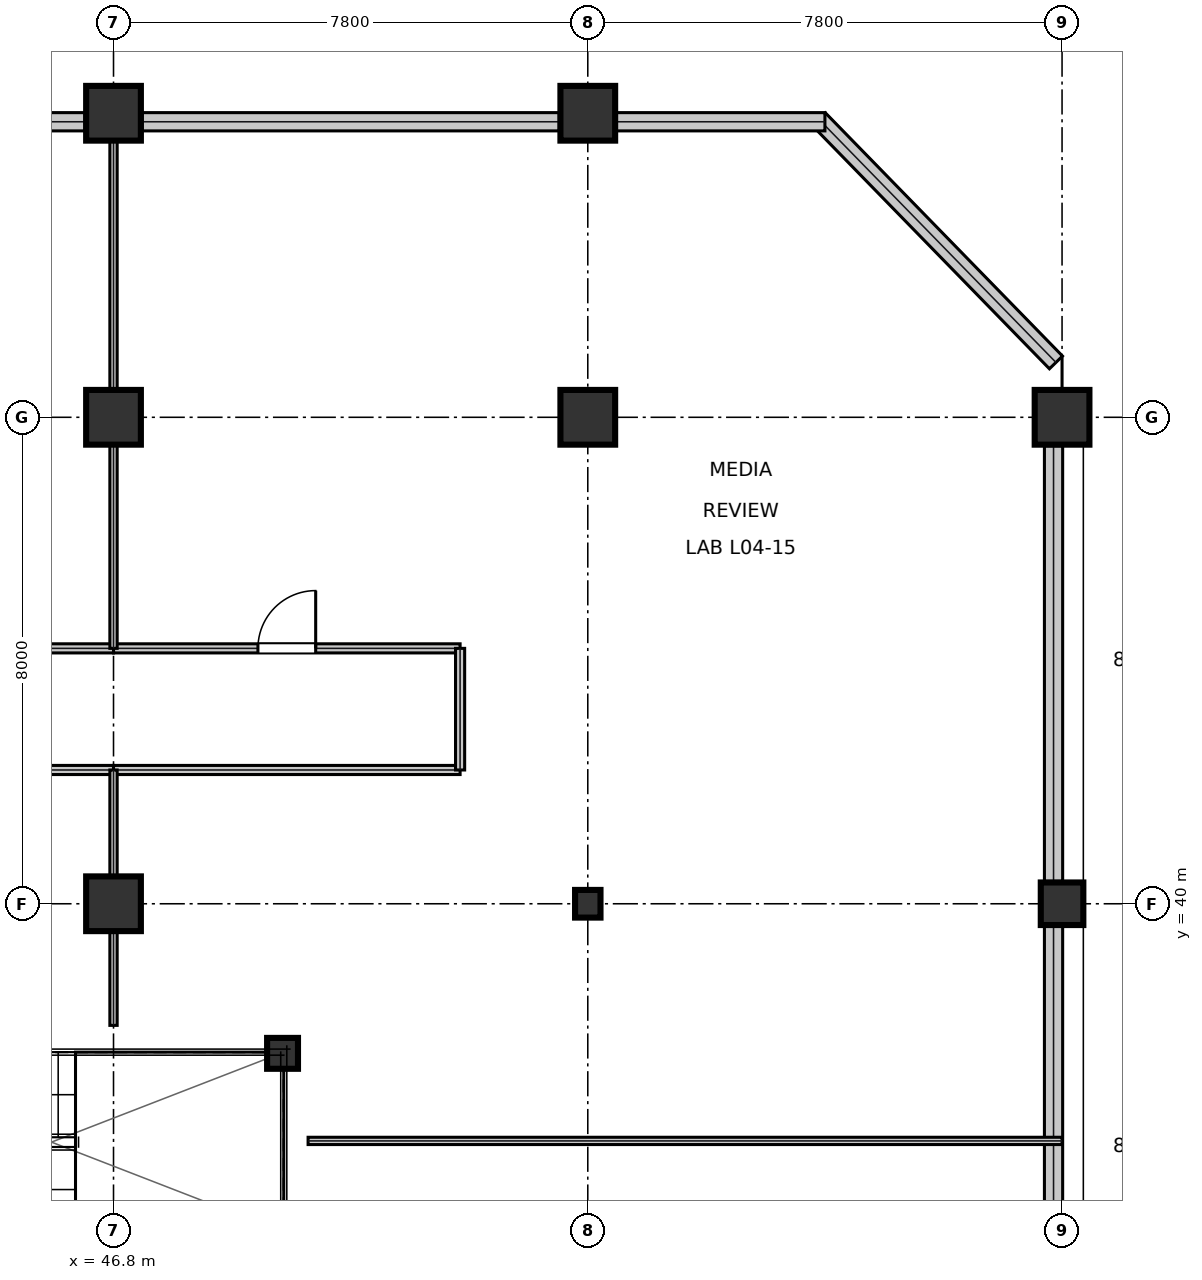
"""IFC4 building model, lengths in metres.
Left out: names, types, materials, properties, quantities, classifications, styles, units other than length and angle.
Written with IfcOpenShell. Run it as: python <this file> out.ifc"""

import sys

from ifc_helpers import new_model, si_unit, direction, frame, frame_2d, origin, origin_2d, place, context, subcontext, project, spatial, rectangle, hollow_circle, i_section, extrude, element, fill, save


model = new_model("IFC4")
c1 = context("Model", 3, precision=1e-05, world=origin(), true_north=direction((0.0, 1.0)))
c2 = subcontext(c1, "Body", "Model", "MODEL_VIEW")
j1 = project(units=[si_unit("LENGTHUNIT", "METRE"), si_unit("PLANEANGLEUNIT", "RADIAN")], contexts=[c1])
p1 = place(None, origin())
s1 = spatial("IfcSite", under=j1, at=p1, CompositionType="ELEMENT")
p2 = place(p1, origin())
s2 = spatial("IfcBuilding", under=s1, at=p2, CompositionType="ELEMENT")
p3 = place(p2, frame((0.0, 0.0, 21.6)))
s3 = spatial("IfcBuildingStorey", under=s2, at=p3, CompositionType="ELEMENT", Elevation=21.6)
for number, where, z_axis, x_axis in (
    (1, (46.8, 40.0, 0.0), (0.0, 0.0, 1.0), (1.0, 0.0, 0.0)),
    (2, (46.8, 48.0, 0.0), (0.0, 0.0, 1.0), (1.0, 0.0, 0.0)),
    (3, (46.8, 53.0, 0.0), (0.0, 0.0, 1.0), (1.0, 0.0, 0.0)),
):
    element("IfcColumn", number, at=place(p3, frame(where, z_axis=z_axis, x_axis=x_axis)), inside=s3, PredefinedType="COLUMN", context=c2, shape_type="SweptSolid", body=[
        extrude(rectangle(XDim=0.9, YDim=0.9, at=origin_2d()), origin(), (0.0, 0.0, 1.0), 5.395),
    ])
p4 = place(p3, frame((54.6, 40.0, 0.0), z_axis=(0.0, 0.0, 1.0), x_axis=(1.0, 0.0, 0.0)))
e4 = element("IfcColumn", 4, at=p4, inside=s3, PredefinedType="COLUMN", context=c2, shape_type="SweptSolid", body=[
    extrude(i_section(OverallWidth=0.418, OverallDepth=0.455, WebThickness=0.042, FlangeThickness=0.068, at=origin_2d()), origin(), (0.0, 0.0, 1.0), 5.395),
])
for number, where, z_axis, x_axis in (
    (5, (54.6, 48.0, 0.0), (0.0, 0.0, 1.0), (1.0, 0.0, 0.0)),
    (6, (54.6, 53.0, 0.0), (0.0, 0.0, 1.0), (1.0, 0.0, 0.0)),
):
    element("IfcColumn", number, at=place(p3, frame(where, z_axis=z_axis, x_axis=x_axis)), inside=s3, PredefinedType="COLUMN", context=c2, shape_type="SweptSolid", body=[
        extrude(rectangle(XDim=0.9, YDim=0.9, at=origin_2d()), origin(), (0.0, 0.0, 1.0), 5.395),
    ])
p5 = place(p3, frame((62.4, 40.0, 0.0), z_axis=(0.0, 0.0, 1.0), x_axis=(1.0, 0.0, 0.0)))
e7 = element("IfcColumn", 7, at=p5, inside=s3, PredefinedType="PILASTER", context=c2, shape_type="SweptSolid", body=[
    extrude(rectangle(XDim=0.7, YDim=0.7, at=origin_2d()), origin(), (0.0, 0.0, 1.0), 5.395),
])
p6 = place(p3, frame((62.4, 48.0, 0.0), z_axis=(0.0, 0.0, 1.0), x_axis=(1.0, 0.0, 0.0)))
e8 = element("IfcColumn", 8, at=p6, inside=s3, PredefinedType="COLUMN", context=c2, shape_type="SweptSolid", body=[
    extrude(rectangle(XDim=0.9, YDim=0.9, at=origin_2d()), origin(), (0.0, 0.0, 1.0), 5.395),
])
p7 = place(p3, frame((49.58, 37.54, 0.0), z_axis=(0.0, 0.0, 1.0), x_axis=(1.0, 0.0, 0.0)))
e9 = element("IfcColumn", 9, at=p7, inside=s3, PredefinedType="COLUMN", context=c2, shape_type="SweptSolid", body=[
    extrude(hollow_circle(Radius=0.254, WallThickness=0.02, at=origin_2d()), origin(), (0.0, 0.0, 1.0), 5.394),
])
for number, where, z_axis, x_axis in (
    (10, (62.26, 32.468, 0.0), (0.0, 0.0, 1.0), (0.0, 1.0, 0.0)),
    (11, (62.26, 40.368, 0.0), (0.0, 0.0, 1.0), (0.0, 1.0, 0.0)),
):
    element("IfcWall", number, at=place(p3, frame(where, z_axis=z_axis, x_axis=x_axis)), inside=s3, PredefinedType="STANDARD", context=c2, shape_type="SweptSolid", body=[
        extrude(rectangle(XDim=7.164, YDim=0.3, at=frame_2d((3.582, 0.0))), origin(), (0.0, 0.0, 1.0), 4.608),
    ])
p8 = place(p3, frame((62.3, 48.902, 0.0), z_axis=(0.0, 0.0, 1.0), x_axis=(-0.698091174493, 0.716008877106, 0.0)))
e12 = element("IfcWall", 12, at=p8, inside=s3, PredefinedType="STANDARD", context=c2, shape_type="SweptSolid", body=[
    extrude(rectangle(XDim=5.586, YDim=0.3, at=frame_2d((2.793, 0.0))), origin(), (0.0, 0.0, 1.0), 5.08),
])
p9 = place(p3, frame((58.5, 52.86, 0.0), z_axis=(0.0, 0.0, 1.0), x_axis=(-1.0, 0.0, 0.0)))
e13 = element("IfcWall", 13, at=p9, inside=s3, PredefinedType="STANDARD", context=c2, shape_type="SweptSolid", body=[
    extrude(rectangle(XDim=3.432, YDim=0.3, at=frame_2d((1.716, 0.0))), origin(), (0.0, 0.0, 1.0), 5.08),
])
for number, where, z_axis, x_axis in (
    (14, (54.132, 52.86, 0.0), (0.0, 0.0, 1.0), (-1.0, 0.0, 0.0)),
    (15, (46.332, 52.86, 0.0), (0.0, 0.0, 1.0), (-1.0, 0.0, 0.0)),
):
    element("IfcWall", number, at=place(p3, frame(where, z_axis=z_axis, x_axis=x_axis)), inside=s3, PredefinedType="STANDARD", context=c2, shape_type="SweptSolid", body=[
        extrude(rectangle(XDim=6.864, YDim=0.3, at=frame_2d((3.432, 0.0))), origin(), (0.0, 0.0, 1.0), 4.608),
    ])
p10 = place(p3, frame((36.6, 42.2, 0.0), z_axis=(0.0, 0.0, 1.0), x_axis=(1.0, 0.0, 0.0)))
e16 = element("IfcWall", 16, at=p10, inside=s3, PredefinedType="PARTITIONING", context=c2, shape_type="SweptSolid", body=[
    extrude(rectangle(XDim=10.2, YDim=0.15, at=frame_2d((5.1, 0.0))), origin(), (0.0, 0.0, 1.0), 4.375),
])
p11 = place(p10, frame((4.625, 0.0, 0.0)))
e17 = element("IfcOpeningElement", 17, at=p11, cuts=e16, PredefinedType="OPENING", context=c2, shape_type="SweptSolid", body=[
    extrude(rectangle(XDim=0.95, YDim=2.15, at=frame_2d((0.475, 1.075))), frame((0.0, 0.085, 0.0), z_axis=(0.0, -1.0, 0.0), x_axis=(1.0, 0.0, 0.0)), (0.0, 0.0, 1.0), 0.17),
])
p12 = place(p3, frame((46.8, 44.2, 0.0), z_axis=(0.0, 0.0, 1.0), x_axis=(1.0, 0.0, 0.0)))
e18 = element("IfcWall", 18, at=p12, inside=s3, PredefinedType="PARTITIONING", context=c2, shape_type="SweptSolid", body=[
    extrude(rectangle(XDim=5.7, YDim=0.15, at=frame_2d((2.85, 0.0))), origin(), (0.0, 0.0, 1.0), 4.375),
])
p13 = place(p12, frame((2.375, 0.0, 0.0)))
e19 = element("IfcOpeningElement", 19, at=p13, cuts=e18, PredefinedType="OPENING", context=c2, shape_type="SweptSolid", body=[
    extrude(rectangle(XDim=0.95, YDim=2.15, at=frame_2d((0.475, 1.075))), frame((0.0, 0.085, 0.0), z_axis=(0.0, -1.0, 0.0), x_axis=(1.0, 0.0, 0.0)), (0.0, 0.0, 1.0), 0.17),
])
p14 = place(p3, frame((36.6, 44.2, 0.0), z_axis=(0.0, 0.0, 1.0), x_axis=(1.0, 0.0, 0.0)))
e20 = element("IfcWall", 20, at=p14, inside=s3, PredefinedType="PARTITIONING", context=c2, shape_type="SweptSolid", body=[
    extrude(rectangle(XDim=10.2, YDim=0.15, at=frame_2d((5.1, 0.0))), origin(), (0.0, 0.0, 1.0), 4.375),
])
p15 = place(p14, frame((4.625, 0.0, 0.0)))
e21 = element("IfcOpeningElement", 21, at=p15, cuts=e20, PredefinedType="OPENING", context=c2, shape_type="SweptSolid", body=[
    extrude(rectangle(XDim=0.95, YDim=2.15, at=frame_2d((0.475, 1.075))), frame((0.0, 0.085, 0.0), z_axis=(0.0, -1.0, 0.0), x_axis=(1.0, 0.0, 0.0)), (0.0, 0.0, 1.0), 0.17),
])
p16 = place(p3, frame((46.8, 42.2, 0.0), z_axis=(0.0, 0.0, 1.0), x_axis=(1.0, 0.0, 0.0)))
e22 = element("IfcWall", 22, at=p16, inside=s3, PredefinedType="PARTITIONING", context=c2, shape_type="SweptSolid", body=[
    extrude(rectangle(XDim=5.7, YDim=0.15, at=frame_2d((2.85, 0.0))), origin(), (0.0, 0.0, 1.0), 4.375),
])
p17 = place(p3, frame((52.5, 42.2, 0.0), z_axis=(0.0, 0.0, 1.0), x_axis=(0.0, 1.0, 0.0)))
e23 = element("IfcWall", 23, at=p17, inside=s3, PredefinedType="PARTITIONING", context=c2, shape_type="SweptSolid", body=[
    extrude(rectangle(XDim=2.0, YDim=0.15, at=frame_2d((1.0, 0.0))), origin(), (0.0, 0.0, 1.0), 4.661),
])
p18 = place(p3, frame((50.0, 36.1, 0.0), z_axis=(0.0, 0.0, 1.0), x_axis=(1.0, 0.0, 0.0)))
e24 = element("IfcWall", 24, at=p18, inside=s3, PredefinedType="PARTITIONING", context=c2, shape_type="SweptSolid", body=[
    extrude(rectangle(XDim=12.4, YDim=0.12, at=frame_2d((6.2, 0.0))), origin(), (0.0, 0.0, 1.0), 4.375),
])
p19 = place(p3, frame((46.8, 38.0, 0.0), z_axis=(0.0, 0.0, 1.0), x_axis=(0.0, 1.0, 0.0)))
e25 = element("IfcWall", 25, at=p19, inside=s3, PredefinedType="PARTITIONING", context=c2, shape_type="SweptSolid", body=[
    extrude(rectangle(XDim=4.2, YDim=0.12, at=frame_2d((2.1, 0.0))), origin(), (0.0, 0.0, 1.0), 4.298),
])
p20 = place(p3, frame((46.8, 44.2, 0.0), z_axis=(0.0, 0.0, 1.0), x_axis=(0.0, 1.0, 0.0)))
e26 = element("IfcWall", 26, at=p20, inside=s3, PredefinedType="PARTITIONING", context=c2, shape_type="SweptSolid", body=[
    extrude(rectangle(XDim=8.8, YDim=0.12, at=frame_2d((4.4, 0.0))), origin(), (0.0, 0.0, 1.0), 4.298),
])
p21 = place(p13, origin())
e27 = element("IfcDoor", 27, at=p21, inside=s3, OperationType="SINGLE_SWING_RIGHT", PredefinedType="DOOR", context=c2, shape_type="SweptSolid", body=[
    extrude(rectangle(XDim=0.95, YDim=2.15, at=frame_2d((0.475, 1.075))), frame((0.0, 0.025, 0.0), z_axis=(0.0, -1.0, 0.0), x_axis=(1.0, 0.0, 0.0)), (0.0, 0.0, 1.0), 0.05),
])
fill(e19, e27)
save(model, sys.argv[1])
